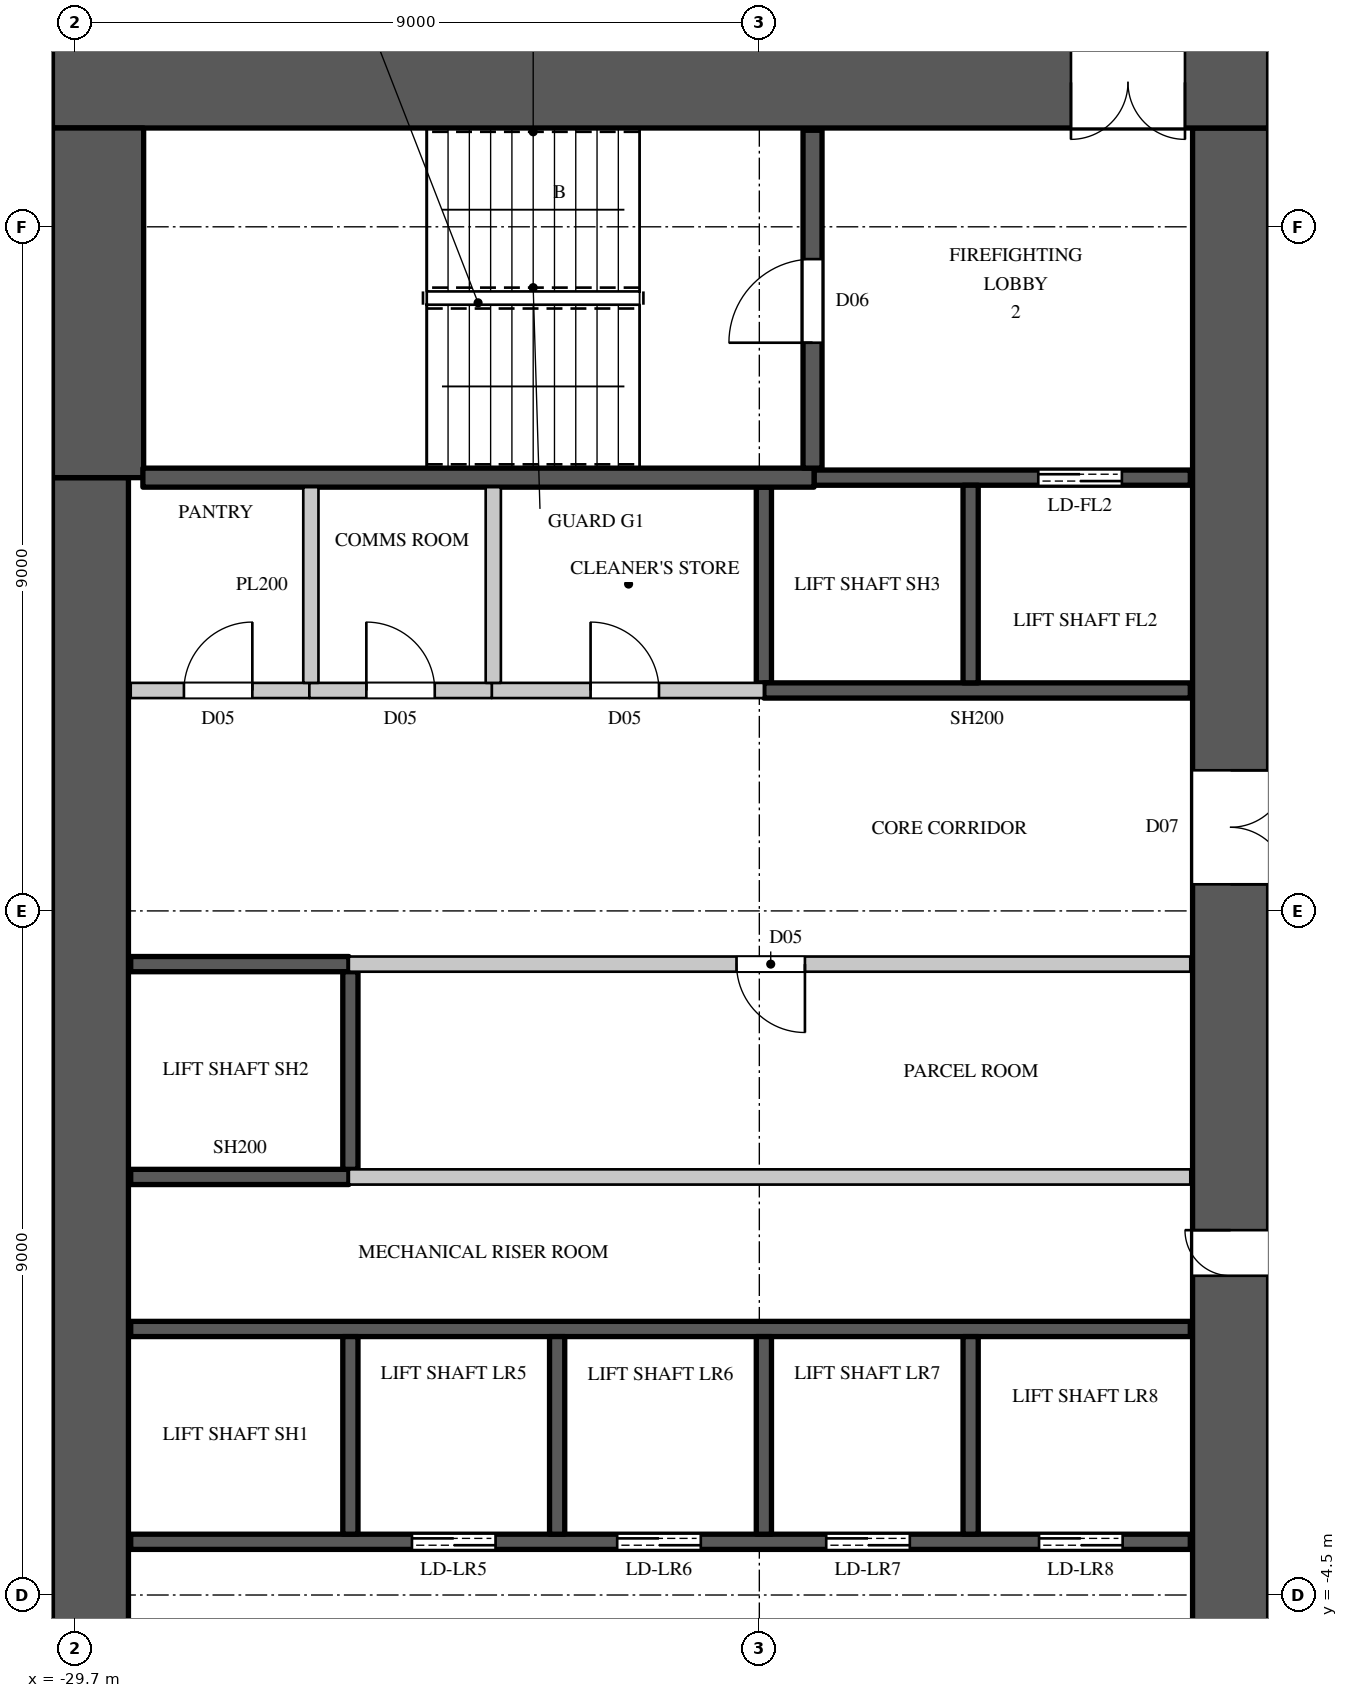
"""IFC4 building model, lengths in metres.
Left out: names, types, materials, properties, quantities, classifications, styles, units other than length and angle.
Written with IfcOpenShell. Run it as: python <this file> out.ifc"""

import sys

from ifc_helpers import new_model, si_unit, direction, frame, frame_2d, origin, place, context, subcontext, project, spatial, rectangle, extrude, element, fill, save


model = new_model("IFC4")
c1 = context("Model", 3, precision=1e-05, world=origin(), true_north=direction((0.0, 1.0)))
c2 = subcontext(c1, "Body", "Model", "MODEL_VIEW")
j1 = project(units=[si_unit("LENGTHUNIT", "METRE"), si_unit("PLANEANGLEUNIT", "RADIAN")], contexts=[c1])
p1 = place(None, origin())
s1 = spatial("IfcSite", under=j1, at=p1, CompositionType="ELEMENT")
p2 = place(p1, origin())
s2 = spatial("IfcBuilding", under=s1, at=p2, CompositionType="ELEMENT")
p3 = place(p2, frame((0.0, 0.0, 116.7)))
s3 = spatial("IfcBuildingStorey", under=s2, at=p3, CompositionType="ELEMENT", Elevation=116.7)
p4 = place(p3, frame((-30.0, 15.4, 0.0), z_axis=(0.0, 0.0, 1.0), x_axis=(1.0, 0.0, 0.0)))
e1 = element("IfcWall", 1, at=p4, inside=s3, PredefinedType="SHEAR", context=c2, shape_type="SweptSolid", body=[
    extrude(rectangle(XDim=16.0, YDim=1.2, at=frame_2d((8.0, 0.0))), origin(), (0.0, 0.0, 1.0), 3.6),
])
p5 = place(p4, frame((13.4, 0.0, 0.0)))
e2 = element("IfcOpeningElement", 2, at=p5, cuts=e1, PredefinedType="OPENING", context=c2, shape_type="SweptSolid", body=[
    extrude(rectangle(XDim=1.5, YDim=2.4, at=frame_2d((0.75, 1.2))), frame((0.0, 0.61, 0.0), z_axis=(0.0, -1.0, 0.0), x_axis=(1.0, 0.0, 0.0)), (0.0, 0.0, 1.0), 1.22),
])
p6 = place(p3, frame((-14.5, -14.8, 0.0), z_axis=(0.0, 0.0, 1.0), x_axis=(0.0, 1.0, 0.0)))
e3 = element("IfcWall", 3, at=p6, inside=s3, PredefinedType="SHEAR", context=c2, shape_type="SweptSolid", body=[
    extrude(rectangle(XDim=29.6, YDim=1.0, at=frame_2d((14.8, 0.0))), origin(), (0.0, 0.0, 1.0), 3.6),
])
p7 = place(p6, frame((8.45, 0.0, 0.0)))
e4 = element("IfcOpeningElement", 4, at=p7, cuts=e3, PredefinedType="OPENING", context=c2, shape_type="SweptSolid", body=[
    extrude(rectangle(XDim=1.5, YDim=2.4, at=frame_2d((0.75, 1.2))), frame((0.0, 0.51, 0.0), z_axis=(0.0, -1.0, 0.0), x_axis=(1.0, 0.0, 0.0)), (0.0, 0.0, 1.0), 1.02),
])
p8 = place(p6, frame((19.65, 0.0, 0.0)))
e5 = element("IfcOpeningElement", 5, at=p8, cuts=e3, PredefinedType="OPENING", context=c2, shape_type="SweptSolid", body=[
    extrude(rectangle(XDim=1.5, YDim=2.4, at=frame_2d((0.75, 1.2))), frame((0.0, 0.51, 0.0), z_axis=(0.0, -1.0, 0.0), x_axis=(1.0, 0.0, 0.0)), (0.0, 0.0, 1.0), 1.02),
])
p9 = place(p6, frame((14.5, 0.0, 0.0)))
e6 = element("IfcOpeningElement", 6, at=p9, cuts=e3, PredefinedType="OPENING", context=c2, shape_type="SweptSolid", body=[
    extrude(rectangle(XDim=0.6, YDim=2.0, at=frame_2d((0.3, 1.0))), frame((0.0, 0.51, 0.0), z_axis=(0.0, -1.0, 0.0), x_axis=(1.0, 0.0, 0.0)), (0.0, 0.0, 1.0), 1.02),
])
p10 = place(p3, frame((-29.5, -10.2, 0.0), z_axis=(0.0, 0.0, 1.0), x_axis=(0.0, 1.0, 0.0)))
e7 = element("IfcWall", 7, at=p10, inside=s3, PredefinedType="SHEAR", context=c2, shape_type="SweptSolid", body=[
    extrude(rectangle(XDim=20.4, YDim=1.0, at=frame_2d((10.2, 0.0))), origin(), (0.0, 0.0, 1.0), 3.6),
])
p11 = place(p3, frame((-29.4, 10.2, 0.0), z_axis=(0.0, 0.0, 1.0), x_axis=(0.0, 1.0, 0.0)))
e8 = element("IfcWall", 8, at=p11, inside=s3, PredefinedType="SHEAR", context=c2, shape_type="SweptSolid", body=[
    extrude(rectangle(XDim=4.6, YDim=1.2, at=frame_2d((2.3, 0.0))), origin(), (0.0, 0.0, 1.0), 3.6),
])
p12 = place(p3, frame((-28.97, 7.4, 0.0), z_axis=(0.0, 0.0, 1.0), x_axis=(1.0, 0.0, 0.0)))
e9 = element("IfcWall", 9, at=p12, inside=s3, PredefinedType="PARTITIONING", context=c2, shape_type="SweptSolid", body=[
    extrude(rectangle(XDim=2.35, YDim=0.2, at=frame_2d((1.175, 0.0))), origin(), (0.0, 0.0, 1.0), 3.3),
])
p13 = place(p12, frame((0.7, 0.0, 0.0)))
e10 = element("IfcOpeningElement", 10, at=p13, cuts=e9, PredefinedType="OPENING", context=c2, shape_type="SweptSolid", body=[
    extrude(rectangle(XDim=0.9, YDim=2.2, at=frame_2d((0.45, 1.1))), frame((0.0, 0.11, 0.0), z_axis=(0.0, -1.0, 0.0), x_axis=(1.0, 0.0, 0.0)), (0.0, 0.0, 1.0), 0.22),
])
p14 = place(p3, frame((-26.1, 3.8, 0.0), z_axis=(0.0, 0.0, 1.0), x_axis=(1.0, 0.0, 0.0)))
e11 = element("IfcWall", 11, at=p14, inside=s3, PredefinedType="PARTITIONING", context=c2, shape_type="SweptSolid", body=[
    extrude(rectangle(XDim=11.07, YDim=0.2, at=frame_2d((5.535, 0.0))), origin(), (0.0, 0.0, 1.0), 3.3),
])
p15 = place(p14, frame((5.1, 0.0, 0.0)))
e12 = element("IfcOpeningElement", 12, at=p15, cuts=e11, PredefinedType="OPENING", context=c2, shape_type="SweptSolid", body=[
    extrude(rectangle(XDim=0.9, YDim=2.2, at=frame_2d((0.45, 1.1))), frame((0.0, 0.11, 0.0), z_axis=(0.0, -1.0, 0.0), x_axis=(1.0, 0.0, 0.0)), (0.0, 0.0, 1.0), 0.22),
])
p16 = place(p3, frame((-24.22, 7.4, 0.0), z_axis=(0.0, 0.0, 1.0), x_axis=(1.0, 0.0, 0.0)))
e13 = element("IfcWall", 13, at=p16, inside=s3, PredefinedType="PARTITIONING", context=c2, shape_type="SweptSolid", body=[
    extrude(rectangle(XDim=3.58, YDim=0.2, at=frame_2d((1.79, 0.0))), origin(), (0.0, 0.0, 1.0), 3.3),
])
p17 = place(p16, frame((1.3, 0.0, 0.0)))
e14 = element("IfcOpeningElement", 14, at=p17, cuts=e13, PredefinedType="OPENING", context=c2, shape_type="SweptSolid", body=[
    extrude(rectangle(XDim=0.9, YDim=2.2, at=frame_2d((0.45, 1.1))), frame((0.0, 0.11, 0.0), z_axis=(0.0, -1.0, 0.0), x_axis=(1.0, 0.0, 0.0)), (0.0, 0.0, 1.0), 0.22),
])
p18 = place(p3, frame((-26.62, 7.4, 0.0), z_axis=(0.0, 0.0, 1.0), x_axis=(1.0, 0.0, 0.0)))
e15 = element("IfcWall", 15, at=p18, inside=s3, PredefinedType="PARTITIONING", context=c2, shape_type="SweptSolid", body=[
    extrude(rectangle(XDim=2.4, YDim=0.2, at=frame_2d((1.2, 0.0))), origin(), (0.0, 0.0, 1.0), 3.3),
])
p19 = place(p18, frame((0.75, 0.0, 0.0)))
e16 = element("IfcOpeningElement", 16, at=p19, cuts=e15, PredefinedType="OPENING", context=c2, shape_type="SweptSolid", body=[
    extrude(rectangle(XDim=0.9, YDim=2.2, at=frame_2d((0.45, 1.1))), frame((0.0, 0.11, 0.0), z_axis=(0.0, -1.0, 0.0), x_axis=(1.0, 0.0, 0.0)), (0.0, 0.0, 1.0), 0.22),
])
p20 = place(p3, frame((-26.6, 7.5, 0.0), z_axis=(0.0, 0.0, 1.0), x_axis=(0.0, 1.0, 0.0)))
e17 = element("IfcWall", 17, at=p20, inside=s3, PredefinedType="PARTITIONING", context=c2, shape_type="SweptSolid", body=[
    extrude(rectangle(XDim=2.575, YDim=0.2, at=frame_2d((1.288, 0.0))), origin(), (0.0, 0.0, 1.0), 3.3),
])
p21 = place(p3, frame((-26.1, 1.0, 0.0), z_axis=(0.0, 0.0, 1.0), x_axis=(1.0, 0.0, 0.0)))
e18 = element("IfcWall", 18, at=p21, inside=s3, PredefinedType="PARTITIONING", context=c2, shape_type="SweptSolid", body=[
    extrude(rectangle(XDim=11.07, YDim=0.2, at=frame_2d((5.535, 0.0))), origin(), (0.0, 0.0, 1.0), 3.3),
])
p22 = place(p3, frame((-24.2, 7.5, 0.0), z_axis=(0.0, 0.0, 1.0), x_axis=(0.0, 1.0, 0.0)))
e19 = element("IfcWall", 19, at=p22, inside=s3, PredefinedType="PARTITIONING", context=c2, shape_type="SweptSolid", body=[
    extrude(rectangle(XDim=2.575, YDim=0.2, at=frame_2d((1.288, 0.0))), origin(), (0.0, 0.0, 1.0), 3.3),
])
p23 = place(p3, frame((-28.97, -3.8, 0.0), z_axis=(0.0, 0.0, 1.0), x_axis=(1.0, 0.0, 0.0)))
e20 = element("IfcWall", 20, at=p23, inside=s3, PredefinedType="SHEAR", context=c2, shape_type="SweptSolid", body=[
    extrude(rectangle(XDim=13.94, YDim=0.2, at=frame_2d((6.97, 0.0))), origin(), (0.0, 0.0, 1.0), 3.3),
])
p24 = place(p23, frame((3.7, 0.0, 0.0)))
e21 = element("IfcOpeningElement", 21, at=p24, cuts=e20, PredefinedType="OPENING", context=c2, shape_type="SweptSolid", body=[
    extrude(rectangle(XDim=1.1, YDim=2.2, at=frame_2d((0.55, 1.1))), frame((0.0, 0.11, 0.0), z_axis=(0.0, -1.0, 0.0), x_axis=(1.0, 0.0, 0.0)), (0.0, 0.0, 1.0), 0.22),
])
p25 = place(p23, frame((6.4, 0.0, 0.0)))
e22 = element("IfcOpeningElement", 22, at=p25, cuts=e20, PredefinedType="OPENING", context=c2, shape_type="SweptSolid", body=[
    extrude(rectangle(XDim=1.1, YDim=2.2, at=frame_2d((0.55, 1.1))), frame((0.0, 0.11, 0.0), z_axis=(0.0, -1.0, 0.0), x_axis=(1.0, 0.0, 0.0)), (0.0, 0.0, 1.0), 0.22),
])
p26 = place(p23, frame((9.15, 0.0, 0.0)))
e23 = element("IfcOpeningElement", 23, at=p26, cuts=e20, PredefinedType="OPENING", context=c2, shape_type="SweptSolid", body=[
    extrude(rectangle(XDim=1.1, YDim=2.2, at=frame_2d((0.55, 1.1))), frame((0.0, 0.11, 0.0), z_axis=(0.0, -1.0, 0.0), x_axis=(1.0, 0.0, 0.0)), (0.0, 0.0, 1.0), 0.22),
])
p27 = place(p23, frame((11.95, 0.0, 0.0)))
e24 = element("IfcOpeningElement", 24, at=p27, cuts=e20, PredefinedType="OPENING", context=c2, shape_type="SweptSolid", body=[
    extrude(rectangle(XDim=1.1, YDim=2.2, at=frame_2d((0.55, 1.1))), frame((0.0, 0.11, 0.0), z_axis=(0.0, -1.0, 0.0), x_axis=(1.0, 0.0, 0.0)), (0.0, 0.0, 1.0), 0.22),
])
p28 = place(p3, frame((-28.97, -1.0, 0.0), z_axis=(0.0, 0.0, 1.0), x_axis=(1.0, 0.0, 0.0)))
e25 = element("IfcWall", 25, at=p28, inside=s3, PredefinedType="SHEAR", context=c2, shape_type="SweptSolid", body=[
    extrude(rectangle(XDim=13.94, YDim=0.2, at=frame_2d((6.97, 0.0))), origin(), (0.0, 0.0, 1.0), 3.3),
])
for number, where, z_axis, x_axis in (
    (26, (-28.97, 1.0, 0.0), (0.0, 0.0, 1.0), (1.0, 0.0, 0.0)),
    (27, (-28.97, 3.8, 0.0), (0.0, 0.0, 1.0), (1.0, 0.0, 0.0)),
):
    element("IfcWall", number, at=place(p3, frame(where, z_axis=z_axis, x_axis=x_axis)), inside=s3, PredefinedType="SHEAR", context=c2, shape_type="SweptSolid", body=[
        extrude(rectangle(XDim=2.87, YDim=0.2, at=frame_2d((1.435, 0.0))), origin(), (0.0, 0.0, 1.0), 3.3),
    ])
p29 = place(p3, frame((-26.08, -3.7, 0.0), z_axis=(0.0, 0.0, 1.0), x_axis=(0.0, 1.0, 0.0)))
e28 = element("IfcWall", 28, at=p29, inside=s3, PredefinedType="SHEAR", context=c2, shape_type="SweptSolid", body=[
    extrude(rectangle(XDim=2.6, YDim=0.2, at=frame_2d((1.3, 0.0))), origin(), (0.0, 0.0, 1.0), 3.6),
])
p30 = place(p3, frame((-26.08, 1.1, 0.0), z_axis=(0.0, 0.0, 1.0), x_axis=(0.0, 1.0, 0.0)))
e29 = element("IfcWall", 29, at=p30, inside=s3, PredefinedType="SHEAR", context=c2, shape_type="SweptSolid", body=[
    extrude(rectangle(XDim=2.6, YDim=0.2, at=frame_2d((1.3, 0.0))), origin(), (0.0, 0.0, 1.0), 3.3),
])
for number, where, z_axis, x_axis in (
    (30, (-23.36, -3.7, 0.0), (0.0, 0.0, 1.0), (0.0, 1.0, 0.0)),
    (31, (-20.64, -3.7, 0.0), (0.0, 0.0, 1.0), (0.0, 1.0, 0.0)),
):
    element("IfcWall", number, at=place(p3, frame(where, z_axis=z_axis, x_axis=x_axis)), inside=s3, PredefinedType="SHEAR", context=c2, shape_type="SweptSolid", body=[
        extrude(rectangle(XDim=2.6, YDim=0.2, at=frame_2d((1.3, 0.0))), origin(), (0.0, 0.0, 1.0), 3.6),
    ])
p31 = place(p3, frame((-20.64, 7.5, 0.0), z_axis=(0.0, 0.0, 1.0), x_axis=(0.0, 1.0, 0.0)))
e32 = element("IfcWall", 32, at=p31, inside=s3, PredefinedType="SHEAR", context=c2, shape_type="SweptSolid", body=[
    extrude(rectangle(XDim=2.575, YDim=0.2, at=frame_2d((1.288, 0.0))), origin(), (0.0, 0.0, 1.0), 3.3),
])
p32 = place(p3, frame((-20.64, 7.4, 0.0), z_axis=(0.0, 0.0, 1.0), x_axis=(1.0, 0.0, 0.0)))
e33 = element("IfcWall", 33, at=p32, inside=s3, PredefinedType="SHEAR", context=c2, shape_type="SweptSolid", body=[
    extrude(rectangle(XDim=5.61, YDim=0.2, at=frame_2d((2.805, 0.0))), origin(), (0.0, 0.0, 1.0), 3.3),
])
p33 = place(p3, frame((-19.98, 10.2, 0.0), z_axis=(0.0, 0.0, 1.0), x_axis=(1.0, 0.0, 0.0)))
e34 = element("IfcWall", 34, at=p33, inside=s3, PredefinedType="SHEAR", context=c2, shape_type="SweptSolid", body=[
    extrude(rectangle(XDim=4.95, YDim=0.2, at=frame_2d((2.475, 0.0))), origin(), (0.0, 0.0, 1.0), 3.3),
])
p34 = place(p33, frame((2.95, 0.0, 0.0)))
e35 = element("IfcOpeningElement", 35, at=p34, cuts=e34, PredefinedType="OPENING", context=c2, shape_type="SweptSolid", body=[
    extrude(rectangle(XDim=1.1, YDim=2.2, at=frame_2d((0.55, 1.1))), frame((0.0, 0.11, 0.0), z_axis=(0.0, -1.0, 0.0), x_axis=(1.0, 0.0, 0.0)), (0.0, 0.0, 1.0), 0.22),
])
p35 = place(p3, frame((-17.92, -3.7, 0.0), z_axis=(0.0, 0.0, 1.0), x_axis=(0.0, 1.0, 0.0)))
e36 = element("IfcWall", 36, at=p35, inside=s3, PredefinedType="SHEAR", context=c2, shape_type="SweptSolid", body=[
    extrude(rectangle(XDim=2.6, YDim=0.2, at=frame_2d((1.3, 0.0))), origin(), (0.0, 0.0, 1.0), 3.6),
])
p36 = place(p3, frame((-17.92, 7.5, 0.0), z_axis=(0.0, 0.0, 1.0), x_axis=(0.0, 1.0, 0.0)))
e37 = element("IfcWall", 37, at=p36, inside=s3, PredefinedType="SHEAR", context=c2, shape_type="SweptSolid", body=[
    extrude(rectangle(XDim=2.6, YDim=0.2, at=frame_2d((1.3, 0.0))), origin(), (0.0, 0.0, 1.0), 3.6),
])
p37 = place(p3, frame((-28.81, 10.2, 0.0), z_axis=(0.0, 0.0, 1.0), x_axis=(1.0, 0.0, 0.0)))
e38 = element("IfcWall", 38, at=p37, inside=s3, PredefinedType="SHEAR", context=c2, shape_type="SweptSolid", body=[
    extrude(rectangle(XDim=8.83, YDim=0.25, at=frame_2d((4.415, 0.0))), origin(), (0.0, 0.0, 1.0), 3.3),
])
p38 = place(p3, frame((-20.0, 10.325, 0.0), z_axis=(0.0, 0.0, 1.0), x_axis=(0.0, 1.0, 0.0)))
e39 = element("IfcWall", 39, at=p38, inside=s3, PredefinedType="SHEAR", context=c2, shape_type="SweptSolid", body=[
    extrude(rectangle(XDim=4.445, YDim=0.25, at=frame_2d((2.223, 0.0))), origin(), (0.0, 0.0, 1.0), 3.3),
])
p39 = place(p38, frame((1.65, 0.0, 0.0)))
e40 = element("IfcOpeningElement", 40, at=p39, cuts=e39, PredefinedType="OPENING", context=c2, shape_type="SweptSolid", body=[
    extrude(rectangle(XDim=1.1, YDim=2.2, at=frame_2d((0.55, 1.1))), frame((0.0, 0.135, 0.0), z_axis=(0.0, -1.0, 0.0), x_axis=(1.0, 0.0, 0.0)), (0.0, 0.0, 1.0), 0.27),
])
p40 = place(p39, origin())
e41 = element("IfcDoor", 41, at=p40, inside=s3, OperationType="SINGLE_SWING_LEFT", PredefinedType="DOOR", context=c2, shape_type="SweptSolid", body=[
    extrude(rectangle(XDim=1.1, YDim=2.2, at=frame_2d((0.55, 1.1))), frame((0.0, 0.025, 0.0), z_axis=(0.0, -1.0, 0.0), x_axis=(1.0, 0.0, 0.0)), (0.0, 0.0, 1.0), 0.05),
])
fill(e40, e41)
p41 = place(p15, origin())
e42 = element("IfcDoor", 42, at=p41, inside=s3, OperationType="SINGLE_SWING_LEFT", PredefinedType="DOOR", context=c2, shape_type="SweptSolid", body=[
    extrude(rectangle(XDim=0.9, YDim=2.2, at=frame_2d((0.45, 1.1))), frame((0.0, 0.025, 0.0), z_axis=(0.0, -1.0, 0.0), x_axis=(1.0, 0.0, 0.0)), (0.0, 0.0, 1.0), 0.05),
])
fill(e12, e42)
p42 = place(p13, origin())
e43 = element("IfcDoor", 43, at=p42, inside=s3, OperationType="SINGLE_SWING_RIGHT", PredefinedType="DOOR", context=c2, shape_type="SweptSolid", body=[
    extrude(rectangle(XDim=0.9, YDim=2.2, at=frame_2d((0.45, 1.1))), frame((0.0, 0.025, 0.0), z_axis=(0.0, -1.0, 0.0), x_axis=(1.0, 0.0, 0.0)), (0.0, 0.0, 1.0), 0.05),
])
fill(e10, e43)
p43 = place(p19, origin())
e44 = element("IfcDoor", 44, at=p43, inside=s3, OperationType="SINGLE_SWING_LEFT", PredefinedType="DOOR", context=c2, shape_type="SweptSolid", body=[
    extrude(rectangle(XDim=0.9, YDim=2.2, at=frame_2d((0.45, 1.1))), frame((0.0, 0.025, 0.0), z_axis=(0.0, -1.0, 0.0), x_axis=(1.0, 0.0, 0.0)), (0.0, 0.0, 1.0), 0.05),
])
fill(e16, e44)
p44 = place(p17, origin())
e45 = element("IfcDoor", 45, at=p44, inside=s3, OperationType="SINGLE_SWING_LEFT", PredefinedType="DOOR", context=c2, shape_type="SweptSolid", body=[
    extrude(rectangle(XDim=0.9, YDim=2.2, at=frame_2d((0.45, 1.1))), frame((0.0, 0.025, 0.0), z_axis=(0.0, -1.0, 0.0), x_axis=(1.0, 0.0, 0.0)), (0.0, 0.0, 1.0), 0.05),
])
fill(e14, e45)
p45 = place(p24, origin())
e46 = element("IfcDoor", 46, at=p45, inside=s3, OperationType="DOUBLE_DOOR_SLIDING", PredefinedType="DOOR", context=c2, shape_type="SweptSolid", body=[
    extrude(rectangle(XDim=1.1, YDim=2.2, at=frame_2d((0.55, 1.1))), frame((0.0, 0.025, 0.0), z_axis=(0.0, -1.0, 0.0), x_axis=(1.0, 0.0, 0.0)), (0.0, 0.0, 1.0), 0.05),
])
fill(e21, e46)
p46 = place(p25, origin())
e47 = element("IfcDoor", 47, at=p46, inside=s3, OperationType="DOUBLE_DOOR_SLIDING", PredefinedType="DOOR", context=c2, shape_type="SweptSolid", body=[
    extrude(rectangle(XDim=1.1, YDim=2.2, at=frame_2d((0.55, 1.1))), frame((0.0, 0.025, 0.0), z_axis=(0.0, -1.0, 0.0), x_axis=(1.0, 0.0, 0.0)), (0.0, 0.0, 1.0), 0.05),
])
fill(e22, e47)
p47 = place(p26, origin())
e48 = element("IfcDoor", 48, at=p47, inside=s3, OperationType="DOUBLE_DOOR_SLIDING", PredefinedType="DOOR", context=c2, shape_type="SweptSolid", body=[
    extrude(rectangle(XDim=1.1, YDim=2.2, at=frame_2d((0.55, 1.1))), frame((0.0, 0.025, 0.0), z_axis=(0.0, -1.0, 0.0), x_axis=(1.0, 0.0, 0.0)), (0.0, 0.0, 1.0), 0.05),
])
fill(e23, e48)
p48 = place(p27, origin())
e49 = element("IfcDoor", 49, at=p48, inside=s3, OperationType="DOUBLE_DOOR_SLIDING", PredefinedType="DOOR", context=c2, shape_type="SweptSolid", body=[
    extrude(rectangle(XDim=1.1, YDim=2.2, at=frame_2d((0.55, 1.1))), frame((0.0, 0.025, 0.0), z_axis=(0.0, -1.0, 0.0), x_axis=(1.0, 0.0, 0.0)), (0.0, 0.0, 1.0), 0.05),
])
fill(e24, e49)
p49 = place(p34, origin())
e50 = element("IfcDoor", 50, at=p49, inside=s3, OperationType="DOUBLE_DOOR_SLIDING", PredefinedType="DOOR", context=c2, shape_type="SweptSolid", body=[
    extrude(rectangle(XDim=1.1, YDim=2.2, at=frame_2d((0.55, 1.1))), frame((0.0, 0.025, 0.0), z_axis=(0.0, -1.0, 0.0), x_axis=(1.0, 0.0, 0.0)), (0.0, 0.0, 1.0), 0.05),
])
fill(e35, e50)
p50 = place(p5, origin())
e51 = element("IfcDoor", 51, at=p50, inside=s3, OperationType="DOUBLE_DOOR_SINGLE_SWING", PredefinedType="DOOR", context=c2, shape_type="SweptSolid", body=[
    extrude(rectangle(XDim=1.5, YDim=2.4, at=frame_2d((0.75, 1.2))), frame((0.0, 0.025, 0.0), z_axis=(0.0, -1.0, 0.0), x_axis=(1.0, 0.0, 0.0)), (0.0, 0.0, 1.0), 0.05),
])
fill(e2, e51)
p51 = place(p8, origin())
e52 = element("IfcDoor", 52, at=p51, inside=s3, OperationType="DOUBLE_DOOR_SINGLE_SWING", PredefinedType="DOOR", context=c2, shape_type="SweptSolid", body=[
    extrude(rectangle(XDim=1.5, YDim=2.4, at=frame_2d((0.75, 1.2))), frame((0.0, -0.445, 0.0), z_axis=(0.0, -1.0, 0.0), x_axis=(1.0, 0.0, 0.0)), (0.0, 0.0, 1.0), 0.05),
])
fill(e5, e52)
p52 = place(p9, origin())
e53 = element("IfcDoor", 53, at=p52, inside=s3, OperationType="SINGLE_SWING_RIGHT", PredefinedType="DOOR", context=c2, shape_type="SweptSolid", body=[
    extrude(rectangle(XDim=0.6, YDim=2.0, at=frame_2d((0.3, 1.0))), frame((0.0, 0.495, 0.0), z_axis=(0.0, -1.0, 0.0), x_axis=(1.0, 0.0, 0.0)), (0.0, 0.0, 1.0), 0.05),
])
fill(e6, e53)
save(model, sys.argv[1])
